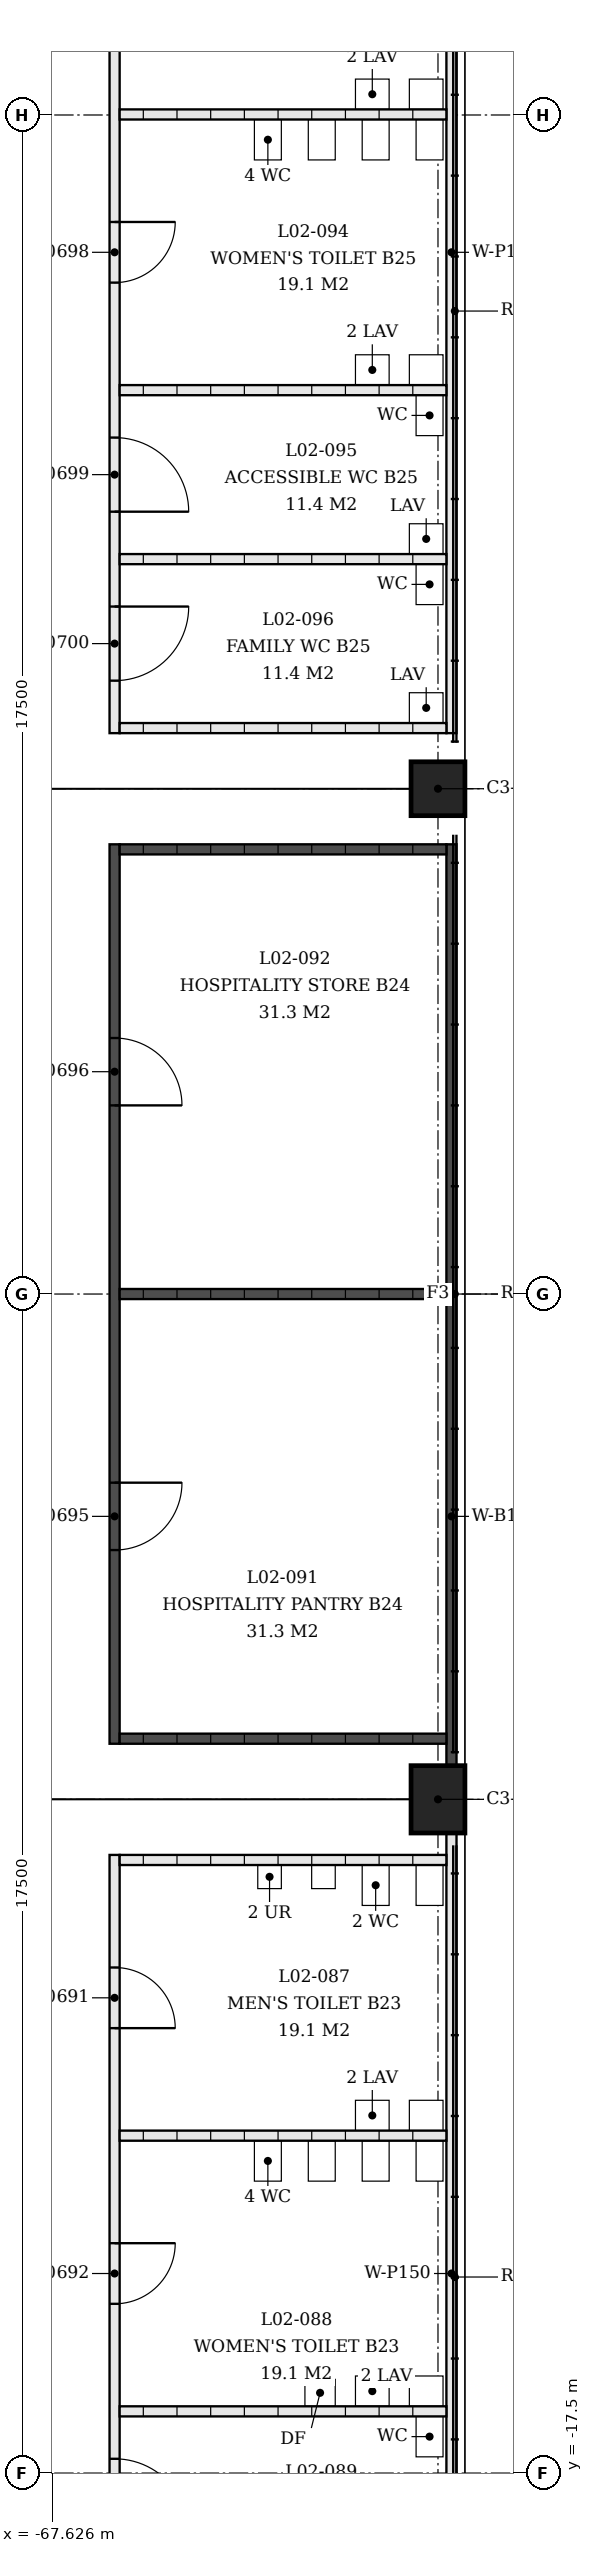
"""IFC4 building model, lengths in metres.
Left out: names, types, materials, properties, quantities, classifications, styles, units other than length and angle.
Written with IfcOpenShell. Run it as: python <this file> out.ifc"""

import sys

from ifc_helpers import new_model, si_unit, direction, frame, frame_2d, origin, origin_2d, place, context, subcontext, project, spatial, rectangle, extrude, element, fill, save


model = new_model("IFC4")
c1 = context("Model", 3, precision=1e-05, world=origin(), true_north=direction((0.0, 1.0)))
c2 = subcontext(c1, "Body", "Model", "MODEL_VIEW")
j1 = project(units=[si_unit("LENGTHUNIT", "METRE"), si_unit("PLANEANGLEUNIT", "RADIAN")], contexts=[c1])
p1 = place(None, origin())
s1 = spatial("IfcSite", under=j1, at=p1, CompositionType="ELEMENT")
p2 = place(p1, origin())
s2 = spatial("IfcBuilding", under=s1, at=p2, CompositionType="ELEMENT")
p3 = place(p2, frame((0.0, 0.0, 9.0)))
s3 = spatial("IfcBuildingStorey", under=s2, at=p3, CompositionType="ELEMENT", Elevation=9.0)
p4 = place(p3, frame((-61.9, -7.5, 0.0), z_axis=(0.0, 0.0, 1.0), x_axis=(0.0, -1.0, 0.0)))
e1 = element("IfcColumn", 1, at=p4, inside=s3, PredefinedType="COLUMN", context=c2, shape_type="SweptSolid", body=[
    extrude(rectangle(XDim=1.0, YDim=0.8, at=origin_2d()), origin(), (0.0, 0.0, 1.0), 4.5),
])
p5 = place(p3, frame((-61.9, 7.5, 0.0), z_axis=(0.0, 0.0, 1.0), x_axis=(0.0, -1.0, 0.0)))
e2 = element("IfcColumn", 2, at=p5, inside=s3, PredefinedType="COLUMN", context=c2, shape_type="SweptSolid", body=[
    extrude(rectangle(XDim=0.8, YDim=0.8, at=origin_2d()), origin(), (0.0, 0.0, 1.0), 4.5),
])
p6 = place(p3, frame((-61.7, -8.0, 0.0), z_axis=(0.0, 0.0, 1.0), x_axis=(0.0, -1.0, 0.0)))
e3 = element("IfcWall", 3, at=p6, inside=s3, PredefinedType="PARTITIONING", context=c2, shape_type="SweptSolid", body=[
    extrude(rectangle(XDim=13.675, YDim=0.15, at=frame_2d((6.837, 0.0))), origin(), (0.0, 0.0, 1.0), 3.0),
])
p7 = place(p3, frame((-66.7, -8.325, 0.0), z_axis=(0.0, 0.0, 1.0), x_axis=(0.0, -1.0, 0.0)))
e4 = element("IfcWall", 4, at=p7, inside=s3, PredefinedType="PARTITIONING", context=c2, shape_type="SweptSolid", body=[
    extrude(rectangle(XDim=13.35, YDim=0.15, at=frame_2d((6.675, 0.0))), origin(), (0.0, 0.0, 1.0), 3.0),
])
p8 = place(p7, frame((1.671, 0.0, 0.0)))
e5 = element("IfcOpeningElement", 5, at=p8, cuts=e4, PredefinedType="OPENING", context=c2, shape_type="SweptSolid", body=[
    extrude(rectangle(XDim=0.9, YDim=2.1, at=frame_2d((0.45, 1.05))), frame((0.0, 0.075, 0.0), z_axis=(0.0, -1.0, 0.0), x_axis=(1.0, 0.0, 0.0)), (0.0, 0.0, 1.0), 0.15),
])
p9 = place(p7, frame((5.763, 0.0, 0.0)))
e6 = element("IfcOpeningElement", 6, at=p9, cuts=e4, PredefinedType="OPENING", context=c2, shape_type="SweptSolid", body=[
    extrude(rectangle(XDim=0.9, YDim=2.1, at=frame_2d((0.45, 1.05))), frame((0.0, 0.075, 0.0), z_axis=(0.0, -1.0, 0.0), x_axis=(1.0, 0.0, 0.0)), (0.0, 0.0, 1.0), 0.15),
])
p10 = place(p7, frame((8.963, 0.0, 0.0)))
e7 = element("IfcOpeningElement", 7, at=p10, cuts=e4, PredefinedType="OPENING", context=c2, shape_type="SweptSolid", body=[
    extrude(rectangle(XDim=1.1, YDim=2.1, at=frame_2d((0.55, 1.05))), frame((0.0, 0.075, 0.0), z_axis=(0.0, -1.0, 0.0), x_axis=(1.0, 0.0, 0.0)), (0.0, 0.0, 1.0), 0.15),
])
p11 = place(p7, frame((11.471, 0.0, 0.0)))
e8 = element("IfcOpeningElement", 8, at=p11, cuts=e4, PredefinedType="OPENING", context=c2, shape_type="SweptSolid", body=[
    extrude(rectangle(XDim=1.1, YDim=2.1, at=frame_2d((0.55, 1.05))), frame((0.0, 0.075, 0.0), z_axis=(0.0, -1.0, 0.0), x_axis=(1.0, 0.0, 0.0)), (0.0, 0.0, 1.0), 0.15),
])
for number, where, z_axis, x_axis in (
    (9, (-61.775, -8.4, 0.0), (0.0, 0.0, 1.0), (-1.0, 0.0, 0.0)),
    (10, (-61.775, -12.492, 0.0), (0.0, 0.0, 1.0), (-1.0, 0.0, 0.0)),
    (11, (-61.775, -16.584, 0.0), (0.0, 0.0, 1.0), (-1.0, 0.0, 0.0)),
):
    element("IfcWall", number, at=place(p3, frame(where, z_axis=z_axis, x_axis=x_axis)), inside=s3, PredefinedType="PARTITIONING", context=c2, shape_type="SweptSolid", body=[
        extrude(rectangle(XDim=4.85, YDim=0.15, at=frame_2d((2.425, 0.0))), origin(), (0.0, 0.0, 1.0), 3.0),
    ])
p12 = place(p3, frame((-61.7, -7.0, 0.0), z_axis=(0.0, 0.0, 1.0), x_axis=(0.0, 1.0, 0.0)))
e12 = element("IfcWall", 12, at=p12, inside=s3, PredefinedType="SOLIDWALL", context=c2, shape_type="SweptSolid", body=[
    extrude(rectangle(XDim=13.675, YDim=0.15, at=frame_2d((6.837, 0.0))), origin(), (0.0, 0.0, 1.0), 3.0),
])
p13 = place(p3, frame((-66.7, -6.675, 0.0), z_axis=(0.0, 0.0, 1.0), x_axis=(0.0, 1.0, 0.0)))
e13 = element("IfcWall", 13, at=p13, inside=s3, PredefinedType="SOLIDWALL", context=c2, shape_type="SweptSolid", body=[
    extrude(rectangle(XDim=13.35, YDim=0.15, at=frame_2d((6.675, 0.0))), origin(), (0.0, 0.0, 1.0), 3.0),
])
p14 = place(p13, frame((2.875, 0.0, 0.0)))
e14 = element("IfcOpeningElement", 14, at=p14, cuts=e13, PredefinedType="OPENING", context=c2, shape_type="SweptSolid", body=[
    extrude(rectangle(XDim=1.0, YDim=2.1, at=frame_2d((0.5, 1.05))), frame((0.0, 0.075, 0.0), z_axis=(0.0, -1.0, 0.0), x_axis=(1.0, 0.0, 0.0)), (0.0, 0.0, 1.0), 0.15),
])
p15 = place(p13, frame((9.475, 0.0, 0.0)))
e15 = element("IfcOpeningElement", 15, at=p15, cuts=e13, PredefinedType="OPENING", context=c2, shape_type="SweptSolid", body=[
    extrude(rectangle(XDim=1.0, YDim=2.1, at=frame_2d((0.5, 1.05))), frame((0.0, 0.075, 0.0), z_axis=(0.0, -1.0, 0.0), x_axis=(1.0, 0.0, 0.0)), (0.0, 0.0, 1.0), 0.15),
])
for number, where, z_axis, x_axis in (
    (16, (-61.775, -6.6, 0.0), (0.0, 0.0, 1.0), (-1.0, 0.0, 0.0)),
    (17, (-61.775, 0.0, 0.0), (0.0, 0.0, 1.0), (-1.0, 0.0, 0.0)),
    (18, (-61.775, 6.6, 0.0), (0.0, 0.0, 1.0), (-1.0, 0.0, 0.0)),
):
    element("IfcWall", number, at=place(p3, frame(where, z_axis=z_axis, x_axis=x_axis)), inside=s3, PredefinedType="SOLIDWALL", context=c2, shape_type="SweptSolid", body=[
        extrude(rectangle(XDim=4.85, YDim=0.15, at=frame_2d((2.425, 0.0))), origin(), (0.0, 0.0, 1.0), 3.0),
    ])
p16 = place(p3, frame((-61.7, 22.0, 0.0), z_axis=(0.0, 0.0, 1.0), x_axis=(0.0, -1.0, 0.0)))
e19 = element("IfcWall", 19, at=p16, inside=s3, PredefinedType="PARTITIONING", context=c2, shape_type="SweptSolid", body=[
    extrude(rectangle(XDim=13.675, YDim=0.15, at=frame_2d((6.837, 0.0))), origin(), (0.0, 0.0, 1.0), 3.0),
])
p17 = place(p3, frame((-66.7, 21.675, 0.0), z_axis=(0.0, 0.0, 1.0), x_axis=(0.0, -1.0, 0.0)))
e20 = element("IfcWall", 20, at=p17, inside=s3, PredefinedType="PARTITIONING", context=c2, shape_type="SweptSolid", body=[
    extrude(rectangle(XDim=13.35, YDim=0.15, at=frame_2d((6.675, 0.0))), origin(), (0.0, 0.0, 1.0), 3.0),
])
p18 = place(p17, frame((1.671, 0.0, 0.0)))
e21 = element("IfcOpeningElement", 21, at=p18, cuts=e20, PredefinedType="OPENING", context=c2, shape_type="SweptSolid", body=[
    extrude(rectangle(XDim=0.9, YDim=2.1, at=frame_2d((0.45, 1.05))), frame((0.0, 0.075, 0.0), z_axis=(0.0, -1.0, 0.0), x_axis=(1.0, 0.0, 0.0)), (0.0, 0.0, 1.0), 0.15),
])
p19 = place(p17, frame((5.763, 0.0, 0.0)))
e22 = element("IfcOpeningElement", 22, at=p19, cuts=e20, PredefinedType="OPENING", context=c2, shape_type="SweptSolid", body=[
    extrude(rectangle(XDim=0.9, YDim=2.1, at=frame_2d((0.45, 1.05))), frame((0.0, 0.075, 0.0), z_axis=(0.0, -1.0, 0.0), x_axis=(1.0, 0.0, 0.0)), (0.0, 0.0, 1.0), 0.15),
])
p20 = place(p17, frame((8.963, 0.0, 0.0)))
e23 = element("IfcOpeningElement", 23, at=p20, cuts=e20, PredefinedType="OPENING", context=c2, shape_type="SweptSolid", body=[
    extrude(rectangle(XDim=1.1, YDim=2.1, at=frame_2d((0.55, 1.05))), frame((0.0, 0.075, 0.0), z_axis=(0.0, -1.0, 0.0), x_axis=(1.0, 0.0, 0.0)), (0.0, 0.0, 1.0), 0.15),
])
p21 = place(p17, frame((11.471, 0.0, 0.0)))
e24 = element("IfcOpeningElement", 24, at=p21, cuts=e20, PredefinedType="OPENING", context=c2, shape_type="SweptSolid", body=[
    extrude(rectangle(XDim=1.1, YDim=2.1, at=frame_2d((0.55, 1.05))), frame((0.0, 0.075, 0.0), z_axis=(0.0, -1.0, 0.0), x_axis=(1.0, 0.0, 0.0)), (0.0, 0.0, 1.0), 0.15),
])
for number, where, z_axis, x_axis in (
    (25, (-61.775, 17.508, 0.0), (0.0, 0.0, 1.0), (-1.0, 0.0, 0.0)),
    (26, (-61.775, 13.416, 0.0), (0.0, 0.0, 1.0), (-1.0, 0.0, 0.0)),
    (27, (-61.775, 10.908, 0.0), (0.0, 0.0, 1.0), (-1.0, 0.0, 0.0)),
    (28, (-61.775, 8.4, 0.0), (0.0, 0.0, 1.0), (-1.0, 0.0, 0.0)),
):
    element("IfcWall", number, at=place(p3, frame(where, z_axis=z_axis, x_axis=x_axis)), inside=s3, PredefinedType="PARTITIONING", context=c2, shape_type="SweptSolid", body=[
        extrude(rectangle(XDim=4.85, YDim=0.15, at=frame_2d((2.425, 0.0))), origin(), (0.0, 0.0, 1.0), 3.0),
    ])
p22 = place(p8, origin())
e29 = element("IfcDoor", 29, at=p22, inside=s3, OperationType="SINGLE_SWING_LEFT", PredefinedType="DOOR", context=c2, shape_type="SweptSolid", body=[
    extrude(rectangle(XDim=0.9, YDim=2.1, at=frame_2d((0.45, 1.05))), frame((0.0, 0.025, 0.0), z_axis=(0.0, -1.0, 0.0), x_axis=(1.0, 0.0, 0.0)), (0.0, 0.0, 1.0), 0.05),
])
fill(e5, e29)
p23 = place(p9, origin())
e30 = element("IfcDoor", 30, at=p23, inside=s3, OperationType="SINGLE_SWING_RIGHT", PredefinedType="DOOR", context=c2, shape_type="SweptSolid", body=[
    extrude(rectangle(XDim=0.9, YDim=2.1, at=frame_2d((0.45, 1.05))), frame((0.0, 0.025, 0.0), z_axis=(0.0, -1.0, 0.0), x_axis=(1.0, 0.0, 0.0)), (0.0, 0.0, 1.0), 0.05),
])
fill(e6, e30)
p24 = place(p10, origin())
e31 = element("IfcDoor", 31, at=p24, inside=s3, OperationType="SINGLE_SWING_LEFT", PredefinedType="DOOR", context=c2, shape_type="SweptSolid", body=[
    extrude(rectangle(XDim=1.1, YDim=2.1, at=frame_2d((0.55, 1.05))), frame((0.0, 0.025, 0.0), z_axis=(0.0, -1.0, 0.0), x_axis=(1.0, 0.0, 0.0)), (0.0, 0.0, 1.0), 0.05),
])
fill(e7, e31)
p25 = place(p14, origin())
e32 = element("IfcDoor", 32, at=p25, inside=s3, OperationType="SINGLE_SWING_RIGHT", PredefinedType="DOOR", context=c2, shape_type="SweptSolid", body=[
    extrude(rectangle(XDim=1.0, YDim=2.1, at=frame_2d((0.5, 1.05))), frame((0.0, 0.025, 0.0), z_axis=(0.0, -1.0, 0.0), x_axis=(1.0, 0.0, 0.0)), (0.0, 0.0, 1.0), 0.05),
])
fill(e14, e32)
p26 = place(p15, origin())
e33 = element("IfcDoor", 33, at=p26, inside=s3, OperationType="SINGLE_SWING_LEFT", PredefinedType="DOOR", context=c2, shape_type="SweptSolid", body=[
    extrude(rectangle(XDim=1.0, YDim=2.1, at=frame_2d((0.5, 1.05))), frame((0.0, 0.025, 0.0), z_axis=(0.0, -1.0, 0.0), x_axis=(1.0, 0.0, 0.0)), (0.0, 0.0, 1.0), 0.05),
])
fill(e15, e33)
p27 = place(p19, origin())
e34 = element("IfcDoor", 34, at=p27, inside=s3, OperationType="SINGLE_SWING_RIGHT", PredefinedType="DOOR", context=c2, shape_type="SweptSolid", body=[
    extrude(rectangle(XDim=0.9, YDim=2.1, at=frame_2d((0.45, 1.05))), frame((0.0, 0.025, 0.0), z_axis=(0.0, -1.0, 0.0), x_axis=(1.0, 0.0, 0.0)), (0.0, 0.0, 1.0), 0.05),
])
fill(e22, e34)
p28 = place(p20, origin())
e35 = element("IfcDoor", 35, at=p28, inside=s3, OperationType="SINGLE_SWING_LEFT", PredefinedType="DOOR", context=c2, shape_type="SweptSolid", body=[
    extrude(rectangle(XDim=1.1, YDim=2.1, at=frame_2d((0.55, 1.05))), frame((0.0, 0.025, 0.0), z_axis=(0.0, -1.0, 0.0), x_axis=(1.0, 0.0, 0.0)), (0.0, 0.0, 1.0), 0.05),
])
fill(e23, e35)
p29 = place(p21, origin())
e36 = element("IfcDoor", 36, at=p29, inside=s3, OperationType="SINGLE_SWING_RIGHT", PredefinedType="DOOR", context=c2, shape_type="SweptSolid", body=[
    extrude(rectangle(XDim=1.1, YDim=2.1, at=frame_2d((0.55, 1.05))), frame((0.0, 0.025, 0.0), z_axis=(0.0, -1.0, 0.0), x_axis=(1.0, 0.0, 0.0)), (0.0, 0.0, 1.0), 0.05),
])
fill(e24, e36)
save(model, sys.argv[1])
